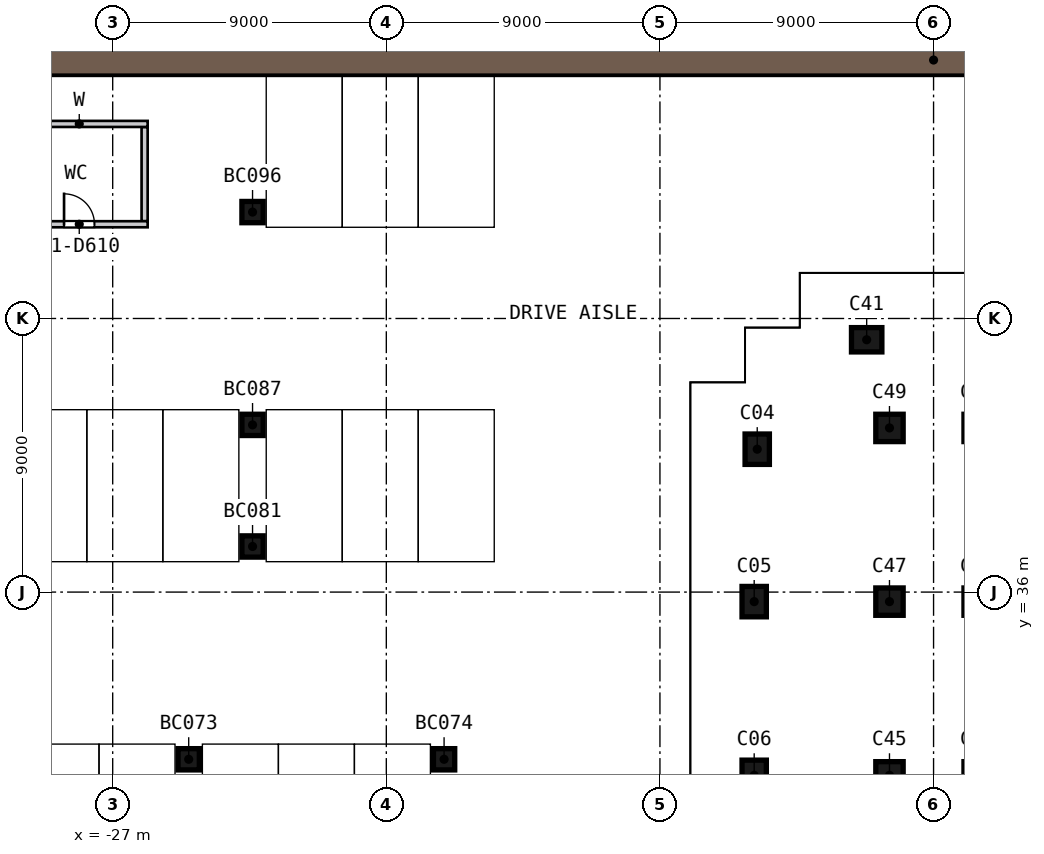
"""IFC4 building model, lengths in metres.
Left out: names, types, materials, properties, quantities, classifications, styles, units other than length and angle.
Written with IfcOpenShell. Run it as: python <this file> out.ifc"""

import sys

from ifc_helpers import new_model, si_unit, direction, frame, frame_2d, origin, origin_2d, place, context, subcontext, project, spatial, polyline, rectangle, outline, extrude, element, fill, save


model = new_model("IFC4")
c1 = context("Model", 3, precision=1e-05, world=origin(), true_north=direction((0.0, 1.0)))
c2 = subcontext(c1, "Body", "Model", "MODEL_VIEW")
j1 = project(units=[si_unit("LENGTHUNIT", "METRE"), si_unit("PLANEANGLEUNIT", "RADIAN")], contexts=[c1])
p1 = place(None, origin())
s1 = spatial("IfcSite", under=j1, at=p1, CompositionType="ELEMENT")
p2 = place(p1, origin())
s2 = spatial("IfcBuilding", under=s1, at=p2, CompositionType="ELEMENT")
p3 = place(p2, frame((0.0, 0.0, -3.9)))
s3 = spatial("IfcBuildingStorey", under=s2, at=p3, CompositionType="ELEMENT", Elevation=-3.9)
for number, where, z_axis, x_axis in (
    (1, (-5.8, 40.7, 0.0), (0.0, 0.0, 1.0), (0.0, -1.0, 0.0)),
    (2, (-5.9, 35.686, 0.0), (0.0, 0.0, 1.0), (0.0, -1.0, 0.0)),
    (3, (-5.9, 29.972, 0.0), (0.0, 0.0, 1.0), (0.0, -1.0, 0.0)),
    (4, (-2.2, 44.3, 0.0), (0.0, 0.0, 1.0), (-1.0, 0.0, 0.0)),
):
    element("IfcColumn", number, at=place(p3, frame(where, z_axis=z_axis, x_axis=x_axis)), inside=s3, PredefinedType="COLUMN", context=c2, shape_type="SweptSolid", body=[
        extrude(rectangle(XDim=1.0, YDim=0.8, at=origin_2d()), origin(), (0.0, 0.0, 1.0), 3.45),
    ])
for number, where, z_axis, x_axis in (
    (5, (-1.45, 29.972, 0.0), (0.0, 0.0, 1.0), (0.0, 1.0, 0.0)),
    (6, (-1.45, 35.686, 0.0), (0.0, 0.0, 1.0), (0.0, 1.0, 0.0)),
    (7, (-1.45, 41.4, 0.0), (0.0, 0.0, 1.0), (0.0, 1.0, 0.0)),
):
    element("IfcColumn", number, at=place(p3, frame(where, z_axis=z_axis, x_axis=x_axis)), inside=s3, PredefinedType="COLUMN", context=c2, shape_type="SweptSolid", body=[
        extrude(rectangle(XDim=0.9, YDim=0.9, at=origin_2d()), origin(), (0.0, 0.0, 1.0), 3.45),
    ])
p4 = place(p3, origin())
e8 = element("IfcWall", 8, at=p4, inside=s3, PredefinedType="SOLIDWALL", context=c2, shape_type="SweptSolid", body=[
    extrude(outline(polyline([(54.0, 54.0), (-54.0, 54.0), (-53.0, 53.0), (53.0, 53.0), (54.0, 54.0)])), origin(), (0.0, 0.0, 1.0), 3.9),
])
for number, where, z_axis, x_axis in (
    (9, (-24.5, 30.5, 0.0), (0.0, 0.0, 1.0), (1.0, 0.0, 0.0)),
    (10, (-16.1, 30.5, 0.0), (0.0, 0.0, 1.0), (1.0, 0.0, 0.0)),
    (11, (-22.4, 37.5, 0.0), (0.0, 0.0, 1.0), (1.0, 0.0, 0.0)),
    (12, (-22.4, 41.5, 0.0), (0.0, 0.0, 1.0), (1.0, 0.0, 0.0)),
    (13, (-22.4, 48.5, 0.0), (0.0, 0.0, 1.0), (1.0, 0.0, 0.0)),
):
    element("IfcColumn", number, at=place(p3, frame(where, z_axis=z_axis, x_axis=x_axis)), inside=s3, PredefinedType="COLUMN", context=c2, shape_type="SweptSolid", body=[
        extrude(rectangle(XDim=0.7, YDim=0.7, at=origin_2d()), origin(), (0.0, 0.0, 1.0), 3.84),
    ])
p5 = place(p3, frame((-30.35, 48.1, 0.0), z_axis=(0.0, 0.0, 1.0), x_axis=(1.0, 0.0, 0.0)))
e14 = element("IfcWall", 14, at=p5, inside=s3, PredefinedType="PARTITIONING", context=c2, shape_type="SweptSolid", body=[
    extrude(rectangle(XDim=4.5, YDim=0.2, at=frame_2d((2.25, 0.0))), origin(), (0.0, 0.0, 1.0), 3.3),
])
p6 = place(p5, frame((1.75, 0.0, 0.0)))
e15 = element("IfcOpeningElement", 15, at=p6, cuts=e14, PredefinedType="OPENING", context=c2, shape_type="SweptSolid", body=[
    extrude(rectangle(XDim=1.0, YDim=2.1, at=frame_2d((0.5, 1.05))), frame((0.0, 0.11, 0.0), z_axis=(0.0, -1.0, 0.0), x_axis=(1.0, 0.0, 0.0)), (0.0, 0.0, 1.0), 0.22),
])
p7 = place(p3, frame((-30.35, 51.4, 0.0), z_axis=(0.0, 0.0, 1.0), x_axis=(1.0, 0.0, 0.0)))
e16 = element("IfcWall", 16, at=p7, inside=s3, PredefinedType="PARTITIONING", context=c2, shape_type="SweptSolid", body=[
    extrude(rectangle(XDim=4.5, YDim=0.2, at=frame_2d((2.25, 0.0))), origin(), (0.0, 0.0, 1.0), 3.3),
])
p8 = place(p3, frame((-25.95, 48.2, 0.0), z_axis=(0.0, 0.0, 1.0), x_axis=(0.0, 1.0, 0.0)))
e17 = element("IfcWall", 17, at=p8, inside=s3, PredefinedType="PARTITIONING", context=c2, shape_type="SweptSolid", body=[
    extrude(rectangle(XDim=3.1, YDim=0.2, at=frame_2d((1.55, 0.0))), origin(), (0.0, 0.0, 1.0), 3.3),
])
p9 = place(p6, origin())
e18 = element("IfcDoor", 18, at=p9, inside=s3, OperationType="SINGLE_SWING_LEFT", PredefinedType="DOOR", context=c2, shape_type="SweptSolid", body=[
    extrude(rectangle(XDim=1.0, YDim=2.1, at=frame_2d((0.5, 1.05))), frame((0.0, 0.025, 0.0), z_axis=(0.0, -1.0, 0.0), x_axis=(1.0, 0.0, 0.0)), (0.0, 0.0, 1.0), 0.05),
])
fill(e15, e18)
save(model, sys.argv[1])
